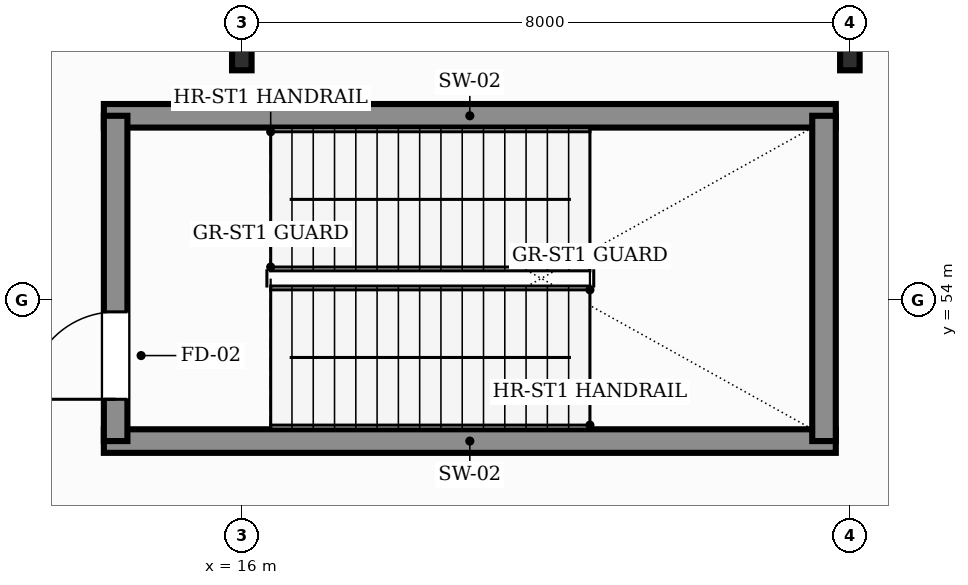
"""IFC4 building model, lengths in metres.
Left out: names, types, materials, properties, quantities, classifications, styles, units other than length and angle.
Written with IfcOpenShell. Run it as: python <this file> out.ifc"""

import sys

from ifc_helpers import new_model, si_unit, direction, frame, frame_2d, origin, origin_2d, place, context, subcontext, project, spatial, rectangle, i_section, extrude, element, fill, save


model = new_model("IFC4")
c1 = context("Model", 3, precision=1e-05, world=origin(), true_north=direction((0.0, 1.0)))
c2 = subcontext(c1, "Body", "Model", "MODEL_VIEW")
j1 = project(units=[si_unit("LENGTHUNIT", "METRE"), si_unit("PLANEANGLEUNIT", "RADIAN")], contexts=[c1])
p1 = place(None, origin())
s1 = spatial("IfcSite", under=j1, at=p1, CompositionType="ELEMENT")
p2 = place(p1, origin())
s2 = spatial("IfcBuilding", under=s1, at=p2, CompositionType="ELEMENT")
p3 = place(p2, origin())
s3 = spatial("IfcBuildingStorey", under=s2, at=p3, CompositionType="ELEMENT", Elevation=0.0)
for number, where, z_axis, x_axis in (
    (1, (16.0, 57.2, 0.0), (0.0, 0.0, 1.0), (1.0, 0.0, 0.0)),
    (2, (24.0, 57.2, 0.0), (0.0, 0.0, 1.0), (1.0, 0.0, 0.0)),
):
    element("IfcColumn", number, at=place(p3, frame(where, z_axis=z_axis, x_axis=x_axis)), inside=s3, PredefinedType="COLUMN", context=c2, shape_type="SweptSolid", body=[
        extrude(i_section(OverallWidth=0.257, OverallDepth=0.363, WebThickness=0.013, FlangeThickness=0.022, FilletRadius=0.015, at=origin_2d()), origin(), (0.0, 0.0, 1.0), 6.0),
    ])
for number, where, z_axis, x_axis in (
    (3, (14.185, 52.14, 0.0), (0.0, 0.0, 1.0), (1.0, 0.0, 0.0)),
    (4, (14.185, 56.42, 0.0), (0.0, 0.0, 1.0), (1.0, 0.0, 0.0)),
):
    element("IfcWall", number, at=place(p3, frame(where, z_axis=z_axis, x_axis=x_axis)), inside=s3, PredefinedType="SHEAR", context=c2, shape_type="SweptSolid", body=[
        extrude(rectangle(XDim=9.63, YDim=0.31, at=frame_2d((4.815, 0.0))), origin(), (0.0, 0.0, 1.0), 6.0),
    ])
p4 = place(p3, frame((14.34, 52.14, 0.0), z_axis=(0.0, 0.0, 1.0), x_axis=(0.0, 1.0, 0.0)))
e5 = element("IfcWall", 5, at=p4, inside=s3, PredefinedType="SHEAR", context=c2, shape_type="SweptSolid", body=[
    extrude(rectangle(XDim=4.28, YDim=0.31, at=frame_2d((2.14, 0.0))), origin(), (0.0, 0.0, 1.0), 6.0),
])
p5 = place(p4, frame((0.55, 0.0, 0.0)))
e6 = element("IfcOpeningElement", 6, at=p5, cuts=e5, PredefinedType="OPENING", context=c2, shape_type="SweptSolid", body=[
    extrude(rectangle(XDim=1.15, YDim=2.2, at=frame_2d((0.575, 1.1))), frame((0.0, 0.165, 0.0), z_axis=(0.0, -1.0, 0.0), x_axis=(1.0, 0.0, 0.0)), (0.0, 0.0, 1.0), 0.33),
])
p6 = place(p3, frame((23.66, 52.14, 0.0), z_axis=(0.0, 0.0, 1.0), x_axis=(0.0, 1.0, 0.0)))
e7 = element("IfcWall", 7, at=p6, inside=s3, PredefinedType="SHEAR", context=c2, shape_type="SweptSolid", body=[
    extrude(rectangle(XDim=4.28, YDim=0.31, at=frame_2d((2.14, 0.0))), origin(), (0.0, 0.0, 1.0), 6.0),
])
p7 = place(p5, origin())
e8 = element("IfcDoor", 8, at=p7, inside=s3, OperationType="SINGLE_SWING_LEFT", PredefinedType="DOOR", context=c2, shape_type="SweptSolid", body=[
    extrude(rectangle(XDim=1.15, YDim=2.2, at=frame_2d((0.575, 1.1))), frame((0.0, 0.025, 0.0), z_axis=(0.0, -1.0, 0.0), x_axis=(1.0, 0.0, 0.0)), (0.0, 0.0, 1.0), 0.05),
])
fill(e6, e8)
save(model, sys.argv[1])
